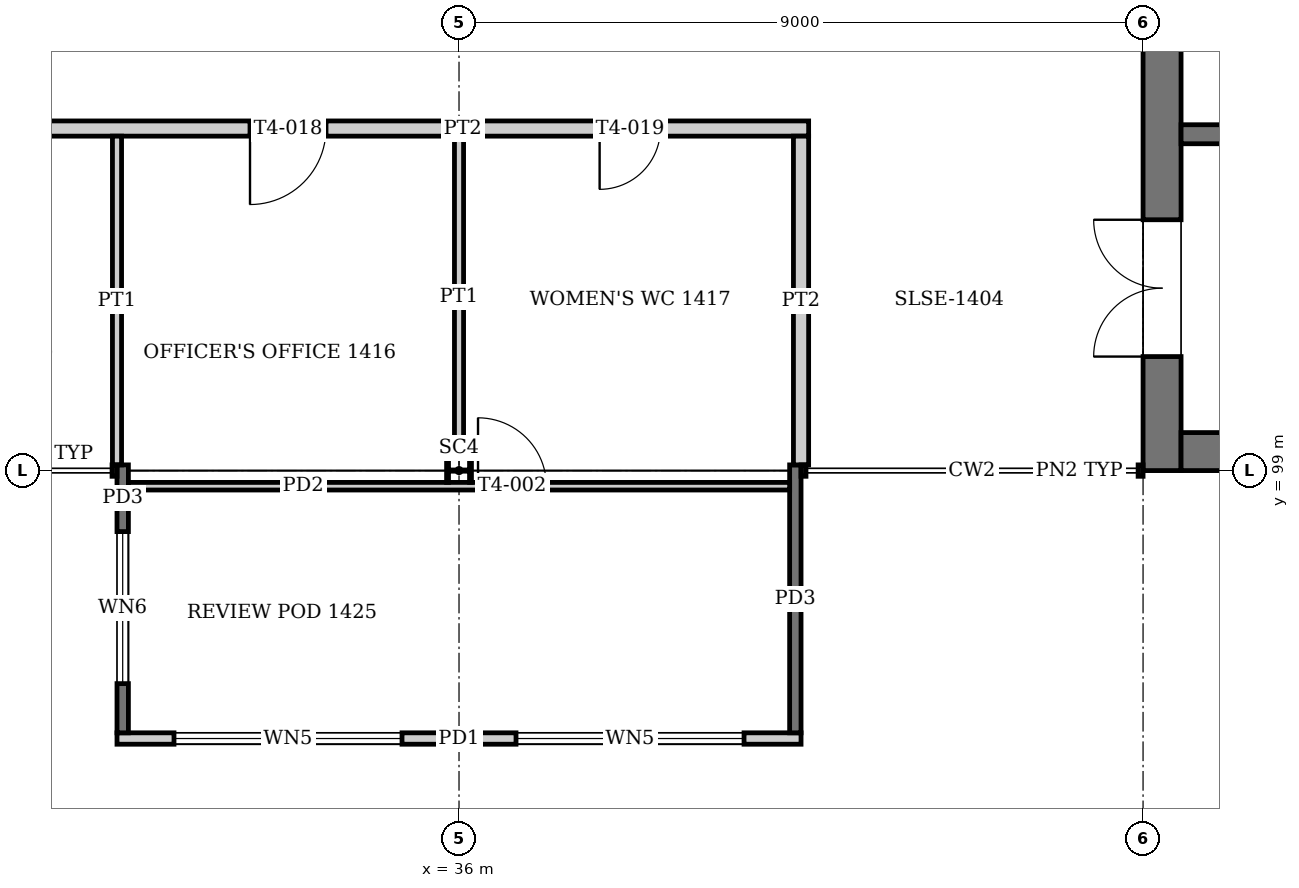
"""IFC4 building model, lengths in metres.
Left out: names, types, materials, properties, quantities, classifications, styles, units other than length and angle.
Written with IfcOpenShell. Run it as: python <this file> out.ifc"""

import sys

from ifc_helpers import new_model, si_unit, direction, frame, frame_2d, origin, origin_2d, place, context, subcontext, project, spatial, rectangle, i_section, extrude, element, fill, save


model = new_model("IFC4")
c1 = context("Model", 3, precision=1e-05, world=origin(), true_north=direction((0.0, 1.0)))
c2 = subcontext(c1, "Body", "Model", "MODEL_VIEW")
j1 = project(units=[si_unit("LENGTHUNIT", "METRE"), si_unit("PLANEANGLEUNIT", "RADIAN")], contexts=[c1])
p1 = place(None, origin())
s1 = spatial("IfcSite", under=j1, at=p1, CompositionType="ELEMENT")
p2 = place(p1, origin())
s2 = spatial("IfcBuilding", under=s1, at=p2, CompositionType="ELEMENT")
p3 = place(p2, frame((0.0, 0.0, 59.2)))
s3 = spatial("IfcBuildingStorey", under=s2, at=p3, CompositionType="ELEMENT", Elevation=59.2)
p4 = place(p3, frame((36.0, 99.0, 0.0), z_axis=(0.0, 0.0, 1.0), x_axis=(0.0, 1.0, 0.0)))
e1 = element("IfcColumn", 1, at=p4, inside=s3, PredefinedType="COLUMN", context=c2, shape_type="SweptSolid", body=[
    extrude(i_section(OverallWidth=0.311, OverallDepth=0.327, WebThickness=0.016, FlangeThickness=0.025, at=origin_2d()), origin(), (0.0, 0.0, 1.0), 4.0),
])
p5 = place(p3, frame((45.25, 99.0, 0.0), z_axis=(0.0, 0.0, 1.0), x_axis=(0.0, 1.0, 0.0)))
e2 = element("IfcWall", 2, at=p5, inside=s3, PredefinedType="SHEAR", context=c2, shape_type="SweptSolid", body=[
    extrude(rectangle(XDim=18.0, YDim=0.5, at=frame_2d((9.0, 0.0))), origin(), (0.0, 0.0, 1.0), 4.0),
])
p6 = place(p5, frame((1.5, 0.0, 0.0)))
e3 = element("IfcOpeningElement", 3, at=p6, cuts=e2, PredefinedType="OPENING", context=c2, shape_type="SweptSolid", body=[
    extrude(rectangle(XDim=1.8, YDim=2.1, at=frame_2d((0.9, 1.05))), frame((0.0, 0.26, 0.0), z_axis=(0.0, -1.0, 0.0), x_axis=(1.0, 0.0, 0.0)), (0.0, 0.0, 1.0), 0.52),
])
p7 = place(p5, frame((14.7, 0.0, 0.0)))
e4 = element("IfcOpeningElement", 4, at=p7, cuts=e2, PredefinedType="OPENING", context=c2, shape_type="SweptSolid", body=[
    extrude(rectangle(XDim=1.8, YDim=2.1, at=frame_2d((0.9, 1.05))), frame((0.0, 0.26, 0.0), z_axis=(0.0, -1.0, 0.0), x_axis=(1.0, 0.0, 0.0)), (0.0, 0.0, 1.0), 0.52),
])
p8 = place(p5, frame((7.5, 0.0, 0.0)))
e5 = element("IfcOpeningElement", 5, at=p8, cuts=e2, PredefinedType="OPENING", context=c2, shape_type="SweptSolid", body=[
    extrude(rectangle(XDim=1.8, YDim=2.1, at=frame_2d((0.9, 1.05))), frame((0.0, 0.26, 0.0), z_axis=(0.0, -1.0, 0.0), x_axis=(1.0, 0.0, 0.0)), (0.0, 0.0, 1.0), 0.52),
])
p9 = place(p3, frame((45.5, 99.25, 0.0), z_axis=(0.0, 0.0, 1.0), x_axis=(1.0, 0.0, 0.0)))
e6 = element("IfcWall", 6, at=p9, inside=s3, PredefinedType="SHEAR", context=c2, shape_type="SweptSolid", body=[
    extrude(rectangle(XDim=8.0, YDim=0.5, at=frame_2d((4.0, 0.0))), origin(), (0.0, 0.0, 1.0), 4.0),
])
p10 = place(p3, frame((31.5, 95.475, 0.0), z_axis=(0.0, 0.0, 1.0), x_axis=(1.0, 0.0, 0.0)))
e7 = element("IfcWall", 7, at=p10, inside=s3, PredefinedType="SOLIDWALL", context=c2, shape_type="SweptSolid", body=[
    extrude(rectangle(XDim=9.0, YDim=0.15, at=frame_2d((4.5, 0.0))), origin(), (0.0, 0.0, 1.0), 2.6),
])
p11 = place(p10, frame((0.75, 0.0, 0.9)))
e8 = element("IfcOpeningElement", 8, at=p11, cuts=e7, PredefinedType="OPENING", context=c2, shape_type="SweptSolid", body=[
    extrude(rectangle(XDim=3.0, YDim=1.4, at=frame_2d((1.5, 0.7))), frame((0.0, 0.085, 0.0), z_axis=(0.0, -1.0, 0.0), x_axis=(1.0, 0.0, 0.0)), (0.0, 0.0, 1.0), 0.17),
])
p12 = place(p10, frame((5.25, 0.0, 0.9)))
e9 = element("IfcOpeningElement", 9, at=p12, cuts=e7, PredefinedType="OPENING", context=c2, shape_type="SweptSolid", body=[
    extrude(rectangle(XDim=3.0, YDim=1.4, at=frame_2d((1.5, 0.7))), frame((0.0, 0.085, 0.0), z_axis=(0.0, -1.0, 0.0), x_axis=(1.0, 0.0, 0.0)), (0.0, 0.0, 1.0), 0.17),
])
p13 = place(p3, frame((31.575, 95.55, -0.15), z_axis=(0.0, 0.0, 1.0), x_axis=(0.0, 1.0, 0.0)))
e10 = element("IfcWall", 10, at=p13, inside=s3, PredefinedType="SOLIDWALL", context=c2, shape_type="SweptSolid", body=[
    extrude(rectangle(XDim=3.525, YDim=0.15, at=frame_2d((1.762, 0.0))), origin(), (0.0, 0.0, 1.0), 2.75),
])
p14 = place(p13, frame((0.647, 0.0, 1.05)))
e11 = element("IfcOpeningElement", 11, at=p14, cuts=e10, PredefinedType="OPENING", context=c2, shape_type="SweptSolid", body=[
    extrude(rectangle(XDim=2.0, YDim=1.4, at=frame_2d((1.0, 0.7))), frame((0.0, 0.085, 0.0), z_axis=(0.0, -1.0, 0.0), x_axis=(1.0, 0.0, 0.0)), (0.0, 0.0, 1.0), 0.17),
])
p15 = place(p3, frame((40.425, 95.55, -0.15), z_axis=(0.0, 0.0, 1.0), x_axis=(0.0, 1.0, 0.0)))
e12 = element("IfcWall", 12, at=p15, inside=s3, PredefinedType="SOLIDWALL", context=c2, shape_type="SweptSolid", body=[
    extrude(rectangle(XDim=3.525, YDim=0.15, at=frame_2d((1.762, 0.0))), origin(), (0.0, 0.0, 1.0), 2.75),
])
p16 = place(p3, frame((31.65, 98.794, 0.0), z_axis=(0.0, 0.0, 1.0), x_axis=(1.0, 0.0, 0.0)))
e13 = element("IfcWall", 13, at=p16, inside=s3, PredefinedType="PARTITIONING", context=c2, shape_type="SweptSolid", body=[
    extrude(rectangle(XDim=8.7, YDim=0.1, at=frame_2d((4.35, 0.0))), origin(), (0.0, 0.0, 1.0), 2.6),
])
p17 = place(p16, frame((4.6, 0.0, 0.0)))
e14 = element("IfcOpeningElement", 14, at=p17, cuts=e13, PredefinedType="OPENING", context=c2, shape_type="SweptSolid", body=[
    extrude(rectangle(XDim=0.9, YDim=2.1, at=frame_2d((0.45, 1.05))), frame((0.0, 0.06, 0.0), z_axis=(0.0, -1.0, 0.0), x_axis=(1.0, 0.0, 0.0)), (0.0, 0.0, 1.0), 0.12),
])
p18 = place(p3, frame((45.5, 103.425, 0.0), z_axis=(0.0, 0.0, 1.0), x_axis=(1.0, 0.0, 0.0)))
e15 = element("IfcWall", 15, at=p18, inside=s3, PredefinedType="SOLIDWALL", context=c2, shape_type="SweptSolid", body=[
    extrude(rectangle(XDim=8.0, YDim=0.25, at=frame_2d((4.0, 0.0))), origin(), (0.0, 0.0, 1.0), 3.75),
])
p19 = place(p3, frame((13.4, 103.5, 0.0), z_axis=(0.0, 0.0, 1.0), x_axis=(1.0, 0.0, 0.0)))
e16 = element("IfcWall", 16, at=p19, inside=s3, PredefinedType="PARTITIONING", context=c2, shape_type="SweptSolid", body=[
    extrude(rectangle(XDim=27.2, YDim=0.2, at=frame_2d((13.6, 0.0))), origin(), (0.0, 0.0, 1.0), 3.05),
])
p20 = place(p19, frame((1.85, 0.0, 0.0)))
e17 = element("IfcOpeningElement", 17, at=p20, cuts=e16, PredefinedType="OPENING", context=c2, shape_type="SweptSolid", body=[
    extrude(rectangle(XDim=1.0, YDim=2.1, at=frame_2d((0.5, 1.05))), frame((0.0, 0.11, 0.0), z_axis=(0.0, -1.0, 0.0), x_axis=(1.0, 0.0, 0.0)), (0.0, 0.0, 1.0), 0.22),
])
p21 = place(p19, frame((6.35, 0.0, 0.0)))
e18 = element("IfcOpeningElement", 18, at=p21, cuts=e16, PredefinedType="OPENING", context=c2, shape_type="SweptSolid", body=[
    extrude(rectangle(XDim=1.0, YDim=2.1, at=frame_2d((0.5, 1.05))), frame((0.0, 0.11, 0.0), z_axis=(0.0, -1.0, 0.0), x_axis=(1.0, 0.0, 0.0)), (0.0, 0.0, 1.0), 0.22),
])
p22 = place(p19, frame((10.85, 0.0, 0.0)))
e19 = element("IfcOpeningElement", 19, at=p22, cuts=e16, PredefinedType="OPENING", context=c2, shape_type="SweptSolid", body=[
    extrude(rectangle(XDim=1.0, YDim=2.1, at=frame_2d((0.5, 1.05))), frame((0.0, 0.11, 0.0), z_axis=(0.0, -1.0, 0.0), x_axis=(1.0, 0.0, 0.0)), (0.0, 0.0, 1.0), 0.22),
])
p23 = place(p19, frame((15.35, 0.0, 0.0)))
e20 = element("IfcOpeningElement", 20, at=p23, cuts=e16, PredefinedType="OPENING", context=c2, shape_type="SweptSolid", body=[
    extrude(rectangle(XDim=1.0, YDim=2.1, at=frame_2d((0.5, 1.05))), frame((0.0, 0.11, 0.0), z_axis=(0.0, -1.0, 0.0), x_axis=(1.0, 0.0, 0.0)), (0.0, 0.0, 1.0), 0.22),
])
p24 = place(p19, frame((19.85, 0.0, 0.0)))
e21 = element("IfcOpeningElement", 21, at=p24, cuts=e16, PredefinedType="OPENING", context=c2, shape_type="SweptSolid", body=[
    extrude(rectangle(XDim=1.0, YDim=2.1, at=frame_2d((0.5, 1.05))), frame((0.0, 0.11, 0.0), z_axis=(0.0, -1.0, 0.0), x_axis=(1.0, 0.0, 0.0)), (0.0, 0.0, 1.0), 0.22),
])
p25 = place(p19, frame((24.45, 0.0, 0.0)))
e22 = element("IfcOpeningElement", 22, at=p25, cuts=e16, PredefinedType="OPENING", context=c2, shape_type="SweptSolid", body=[
    extrude(rectangle(XDim=0.8, YDim=2.1, at=frame_2d((0.4, 1.05))), frame((0.0, 0.11, 0.0), z_axis=(0.0, -1.0, 0.0), x_axis=(1.0, 0.0, 0.0)), (0.0, 0.0, 1.0), 0.22),
])
p26 = place(p3, frame((31.5, 99.075, 0.0), z_axis=(0.0, 0.0, 1.0), x_axis=(0.0, 1.0, 0.0)))
e23 = element("IfcWall", 23, at=p26, inside=s3, PredefinedType="PARTITIONING", context=c2, shape_type="SweptSolid", body=[
    extrude(rectangle(XDim=4.325, YDim=0.12, at=frame_2d((2.163, 0.0))), origin(), (0.0, 0.0, 1.0), 3.05),
])
p27 = place(p3, frame((36.0, 99.164, 0.0), z_axis=(0.0, 0.0, 1.0), x_axis=(0.0, 1.0, 0.0)))
e24 = element("IfcWall", 24, at=p27, inside=s3, PredefinedType="PARTITIONING", context=c2, shape_type="SweptSolid", body=[
    extrude(rectangle(XDim=4.236, YDim=0.12, at=frame_2d((2.118, 0.0))), origin(), (0.0, 0.0, 1.0), 3.05),
])
p28 = place(p3, frame((40.5, 99.075, 0.0), z_axis=(0.0, 0.0, 1.0), x_axis=(0.0, 1.0, 0.0)))
e25 = element("IfcWall", 25, at=p28, inside=s3, PredefinedType="PARTITIONING", context=c2, shape_type="SweptSolid", body=[
    extrude(rectangle(XDim=4.325, YDim=0.2, at=frame_2d((2.163, 0.0))), origin(), (0.0, 0.0, 1.0), 3.05),
])
p29 = place(p11, origin())
e26 = element("IfcWindow", 26, at=p29, inside=s3, PartitioningType="SINGLE_PANEL", PredefinedType="WINDOW", context=c2, shape_type="SweptSolid", body=[
    extrude(rectangle(XDim=3.0, YDim=1.4, at=frame_2d((1.5, 0.7))), frame((0.0, 0.03, 0.0), z_axis=(0.0, -1.0, 0.0), x_axis=(1.0, 0.0, 0.0)), (0.0, 0.0, 1.0), 0.06),
])
fill(e8, e26)
p30 = place(p12, origin())
e27 = element("IfcWindow", 27, at=p30, inside=s3, PartitioningType="SINGLE_PANEL", PredefinedType="WINDOW", context=c2, shape_type="SweptSolid", body=[
    extrude(rectangle(XDim=3.0, YDim=1.4, at=frame_2d((1.5, 0.7))), frame((0.0, 0.03, 0.0), z_axis=(0.0, -1.0, 0.0), x_axis=(1.0, 0.0, 0.0)), (0.0, 0.0, 1.0), 0.06),
])
fill(e9, e27)
p31 = place(p14, origin())
e28 = element("IfcWindow", 28, at=p31, inside=s3, PartitioningType="SINGLE_PANEL", PredefinedType="WINDOW", context=c2, shape_type="SweptSolid", body=[
    extrude(rectangle(XDim=2.0, YDim=1.4, at=frame_2d((1.0, 0.7))), frame((0.0, 0.03, 0.0), z_axis=(0.0, -1.0, 0.0), x_axis=(1.0, 0.0, 0.0)), (0.0, 0.0, 1.0), 0.06),
])
fill(e11, e28)
p32 = place(p17, origin())
e29 = element("IfcDoor", 29, at=p32, inside=s3, OperationType="SINGLE_SWING_LEFT", PredefinedType="DOOR", context=c2, shape_type="SweptSolid", body=[
    extrude(rectangle(XDim=0.9, YDim=2.1, at=frame_2d((0.45, 1.05))), frame((0.0, 0.025, 0.0), z_axis=(0.0, -1.0, 0.0), x_axis=(1.0, 0.0, 0.0)), (0.0, 0.0, 1.0), 0.05),
])
fill(e14, e29)
p33 = place(p24, frame((1.0, 0.0, 0.0), z_axis=(0.0, 0.0, 1.0), x_axis=(-1.0, 0.0, 0.0)))
e30 = element("IfcDoor", 30, at=p33, inside=s3, OperationType="SINGLE_SWING_RIGHT", PredefinedType="DOOR", context=c2, shape_type="SweptSolid", body=[
    extrude(rectangle(XDim=1.0, YDim=2.1, at=frame_2d((0.5, 1.05))), frame((0.0, 0.025, 0.0), z_axis=(0.0, -1.0, 0.0), x_axis=(1.0, 0.0, 0.0)), (0.0, 0.0, 1.0), 0.05),
])
fill(e21, e30)
p34 = place(p25, frame((0.8, 0.0, 0.0), z_axis=(0.0, 0.0, 1.0), x_axis=(-1.0, 0.0, 0.0)))
e31 = element("IfcDoor", 31, at=p34, inside=s3, OperationType="SINGLE_SWING_RIGHT", PredefinedType="DOOR", context=c2, shape_type="SweptSolid", body=[
    extrude(rectangle(XDim=0.8, YDim=2.1, at=frame_2d((0.4, 1.05))), frame((0.0, 0.025, 0.0), z_axis=(0.0, -1.0, 0.0), x_axis=(1.0, 0.0, 0.0)), (0.0, 0.0, 1.0), 0.05),
])
fill(e22, e31)
p35 = place(p6, origin())
e32 = element("IfcDoor", 32, at=p35, inside=s3, OperationType="DOUBLE_DOOR_SINGLE_SWING", PredefinedType="DOOR", context=c2, shape_type="SweptSolid", body=[
    extrude(rectangle(XDim=1.8, YDim=2.1, at=frame_2d((0.9, 1.05))), frame((0.0, 0.025, 0.0), z_axis=(0.0, -1.0, 0.0), x_axis=(1.0, 0.0, 0.0)), (0.0, 0.0, 1.0), 0.05),
])
fill(e3, e32)
save(model, sys.argv[1])
